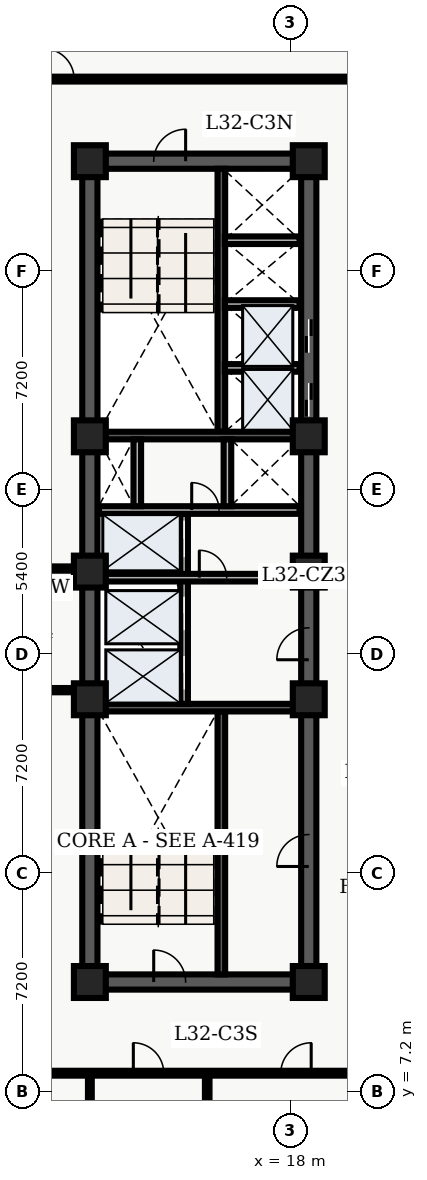
"""IFC4 building model, lengths in metres.
Left out: names, types, materials, properties, quantities, classifications, styles, units other than length and angle.
Written with IfcOpenShell. Run it as: python <this file> out.ifc"""

import sys

from ifc_helpers import new_model, entity, si_unit, converted_unit, direction, frame, origin_with_axes, origin_2d_with_axis, place, context, subcontext, project, spatial, polyline, rectangle, outline, extrude, element, fill, save


model = new_model("IFC4")
c1 = context("Model", 3, precision=1e-05, world=origin_with_axes(), true_north=direction((0.0, 1.0)))
c2 = subcontext(c1, "Body", "Model", "MODEL_VIEW")
j1 = project(units=[si_unit("LENGTHUNIT", "METRE"), converted_unit("PLANEANGLEUNIT", "DEGREE", entity("IfcPlaneAngleMeasure", 0.017), si_unit("PLANEANGLEUNIT", "RADIAN"), dimensions=[0, 0, 0, 0, 0, 0, 0])], contexts=[c1])
p1 = place(None, origin_with_axes())
s1 = spatial("IfcSite", under=j1, at=p1, CompositionType="ELEMENT")
p2 = place(p1, origin_with_axes())
s2 = spatial("IfcBuilding", under=s1, at=p2, CompositionType="ELEMENT")
p3 = place(p2, frame((0.0, 0.0, 132.9), z_axis=(0.0, 0.0, 1.0), x_axis=(1.0, 0.0, 0.0)))
s3 = spatial("IfcBuildingStorey", under=s2, at=p3, CompositionType="ELEMENT", Elevation=132.9)
p4 = place(p3, frame((11.4, 10.8, 0.0), z_axis=(0.0, 0.0, 1.0), x_axis=(0.0, 1.0, 0.0)))
e1 = element("IfcWall", 1, at=p4, inside=s3, PredefinedType="SHEAR", context=c2, shape_type="SweptSolid", body=[
    extrude(outline(polyline([(0.0, -0.25), (27.0, -0.25), (27.0, 0.25), (0.0, 0.25), (0.0, -0.25)])), origin_with_axes(), (0.0, 0.0, 1.0), 3.66),
])
p5 = place(p3, frame((11.4, 10.8, 0.0), z_axis=(0.0, 0.0, 1.0), x_axis=(1.0, 0.0, 0.0)))
e2 = element("IfcWall", 2, at=p5, inside=s3, PredefinedType="SHEAR", context=c2, shape_type="SweptSolid", body=[
    extrude(outline(polyline([(0.0, -0.25), (7.2, -0.25), (7.2, 0.25), (0.0, 0.25), (0.0, -0.25)])), origin_with_axes(), (0.0, 0.0, 1.0), 3.66),
])
p6 = place(p5, frame((2.625, 0.0, 0.0), z_axis=(0.0, 0.0, 1.0), x_axis=(1.0, 0.0, 0.0)))
e3 = element("IfcOpeningElement", 3, at=p6, cuts=e2, PredefinedType="OPENING", context=c2, shape_type="SweptSolid", body=[
    extrude(rectangle(XDim=1.05, YDim=0.52, at=origin_2d_with_axis()), origin_with_axes(), (0.0, 0.0, 1.0), 2.15),
])
p7 = place(p3, frame((11.4, 37.8, 0.0), z_axis=(0.0, 0.0, 1.0), x_axis=(1.0, 0.0, 0.0)))
e4 = element("IfcWall", 4, at=p7, inside=s3, PredefinedType="SHEAR", context=c2, shape_type="SweptSolid", body=[
    extrude(outline(polyline([(0.0, -0.25), (7.2, -0.25), (7.2, 0.25), (0.0, 0.25), (0.0, -0.25)])), origin_with_axes(), (0.0, 0.0, 1.0), 3.66),
])
p8 = place(p7, frame((2.625, 0.0, 0.0), z_axis=(0.0, 0.0, 1.0), x_axis=(1.0, 0.0, 0.0)))
e5 = element("IfcOpeningElement", 5, at=p8, cuts=e4, PredefinedType="OPENING", context=c2, shape_type="SweptSolid", body=[
    extrude(rectangle(XDim=1.05, YDim=0.52, at=origin_2d_with_axis()), origin_with_axes(), (0.0, 0.0, 1.0), 2.15),
])
p9 = place(p3, frame((18.6, 10.8, 0.0), z_axis=(0.0, 0.0, 1.0), x_axis=(0.0, 1.0, 0.0)))
e6 = element("IfcWall", 6, at=p9, inside=s3, PredefinedType="SHEAR", context=c2, shape_type="SweptSolid", body=[
    extrude(outline(polyline([(0.0, -0.25), (13.5, -0.25), (13.5, 0.25), (0.0, 0.25), (0.0, -0.25)])), origin_with_axes(), (0.0, 0.0, 1.0), 3.66),
])
p10 = place(p9, frame((11.125, 0.0, 0.0), z_axis=(0.0, 0.0, 1.0), x_axis=(1.0, 0.0, 0.0)))
e7 = element("IfcOpeningElement", 7, at=p10, cuts=e6, PredefinedType="OPENING", context=c2, shape_type="SweptSolid", body=[
    extrude(rectangle(XDim=1.05, YDim=0.52, at=origin_2d_with_axis()), origin_with_axes(), (0.0, 0.0, 1.0), 2.15),
])
p11 = place(p9, frame((4.325, 0.0, 0.0), z_axis=(0.0, 0.0, 1.0), x_axis=(1.0, 0.0, 0.0)))
e8 = element("IfcOpeningElement", 8, at=p11, cuts=e6, PredefinedType="OPENING", context=c2, shape_type="SweptSolid", body=[
    extrude(rectangle(XDim=1.05, YDim=0.52, at=origin_2d_with_axis()), origin_with_axes(), (0.0, 0.0, 1.0), 2.15),
])
p12 = place(p3, frame((18.6, 24.3, 0.0), z_axis=(0.0, 0.0, 1.0), x_axis=(0.0, 1.0, 0.0)))
e9 = element("IfcWall", 9, at=p12, inside=s3, PredefinedType="SHEAR", context=c2, shape_type="SweptSolid", body=[
    extrude(outline(polyline([(0.0, -0.25), (13.5, -0.25), (13.5, 0.25), (0.0, 0.25), (0.0, -0.25)])), origin_with_axes(), (0.0, 0.0, 1.0), 3.66),
])
p13 = place(p12, frame((5.65, 0.0, 0.0), z_axis=(0.0, 0.0, 1.0), x_axis=(1.0, 0.0, 0.0)))
e10 = element("IfcOpeningElement", 10, at=p13, cuts=e9, PredefinedType="OPENING", context=c2, shape_type="SweptSolid", body=[
    extrude(rectangle(XDim=1.1, YDim=0.52, at=origin_2d_with_axis()), origin_with_axes(), (0.0, 0.0, 1.0), 2.15),
])
p14 = place(p12, frame((7.75, 0.0, 0.0), z_axis=(0.0, 0.0, 1.0), x_axis=(1.0, 0.0, 0.0)))
e11 = element("IfcOpeningElement", 11, at=p14, cuts=e9, PredefinedType="OPENING", context=c2, shape_type="SweptSolid", body=[
    extrude(rectangle(XDim=1.1, YDim=0.52, at=origin_2d_with_axis()), origin_with_axes(), (0.0, 0.0, 1.0), 2.15),
])
p15 = place(p3, frame((15.725, 11.05, 0.0), z_axis=(0.0, 0.0, 1.0), x_axis=(0.0, 1.0, 0.0)))
e12 = element("IfcWall", 12, at=p15, inside=s3, PredefinedType="SHEAR", context=c2, shape_type="SweptSolid", body=[
    extrude(outline(polyline([(0.0, -0.125), (8.65, -0.125), (8.65, 0.125), (0.0, 0.125), (0.0, -0.125)])), origin_with_axes(), (0.0, 0.0, 1.0), 3.66),
])
p16 = place(p3, frame((11.65, 19.825, 0.0), z_axis=(0.0, 0.0, 1.0), x_axis=(1.0, 0.0, 0.0)))
e13 = element("IfcWall", 13, at=p16, inside=s3, PredefinedType="SHEAR", context=c2, shape_type="SweptSolid", body=[
    extrude(outline(polyline([(0.0, -0.125), (6.7, -0.125), (6.7, 0.125), (0.0, 0.125), (0.0, -0.125)])), origin_with_axes(), (0.0, 0.0, 1.0), 3.66),
])
p17 = place(p3, frame((15.725, 28.9, 0.0), z_axis=(0.0, 0.0, 1.0), x_axis=(0.0, 1.0, 0.0)))
e14 = element("IfcWall", 14, at=p17, inside=s3, PredefinedType="SHEAR", context=c2, shape_type="SweptSolid", body=[
    extrude(outline(polyline([(0.0, -0.125), (8.65, -0.125), (8.65, 0.125), (0.0, 0.125), (0.0, -0.125)])), origin_with_axes(), (0.0, 0.0, 1.0), 3.66),
])
p18 = place(p3, frame((11.65, 28.775, 0.0), z_axis=(0.0, 0.0, 1.0), x_axis=(1.0, 0.0, 0.0)))
e15 = element("IfcWall", 15, at=p18, inside=s3, PredefinedType="SHEAR", context=c2, shape_type="SweptSolid", body=[
    extrude(outline(polyline([(0.0, -0.125), (6.7, -0.125), (6.7, 0.125), (0.0, 0.125), (0.0, -0.125)])), origin_with_axes(), (0.0, 0.0, 1.0), 3.66),
])
p19 = place(p3, frame((14.5, 19.95, 0.0), z_axis=(0.0, 0.0, 1.0), x_axis=(0.0, 1.0, 0.0)))
e16 = element("IfcWall", 16, at=p19, inside=s3, PredefinedType="SOLIDWALL", context=c2, shape_type="SweptSolid", body=[
    extrude(outline(polyline([(0.0, -0.125), (6.25, -0.125), (6.25, 0.125), (0.0, 0.125), (0.0, -0.125)])), origin_with_axes(), (0.0, 0.0, 1.0), 2.7),
])
p20 = place(p19, frame((1.025, 0.0, 0.0), z_axis=(0.0, 0.0, 1.0), x_axis=(1.0, 0.0, 0.0)))
e17 = element("IfcOpeningElement", 17, at=p20, cuts=e16, PredefinedType="OPENING", context=c2, shape_type="SweptSolid", body=[
    extrude(rectangle(XDim=1.1, YDim=0.27, at=origin_2d_with_axis()), origin_with_axes(), (0.0, 0.0, 1.0), 2.15),
])
p21 = place(p19, frame((2.975, 0.0, 0.0), z_axis=(0.0, 0.0, 1.0), x_axis=(1.0, 0.0, 0.0)))
e18 = element("IfcOpeningElement", 18, at=p21, cuts=e16, PredefinedType="OPENING", context=c2, shape_type="SweptSolid", body=[
    extrude(rectangle(XDim=1.1, YDim=0.27, at=origin_2d_with_axis()), origin_with_axes(), (0.0, 0.0, 1.0), 2.15),
])
p22 = place(p19, frame((5.425, 0.0, 0.0), z_axis=(0.0, 0.0, 1.0), x_axis=(1.0, 0.0, 0.0)))
e19 = element("IfcOpeningElement", 19, at=p22, cuts=e16, PredefinedType="OPENING", context=c2, shape_type="SweptSolid", body=[
    extrude(rectangle(XDim=1.2, YDim=0.27, at=origin_2d_with_axis()), origin_with_axes(), (0.0, 0.0, 1.0), 2.15),
])
p23 = place(p3, frame((11.7, 24.1, 0.0), z_axis=(0.0, 0.0, 1.0), x_axis=(1.0, 0.0, 0.0)))
e20 = element("IfcWall", 20, at=p23, inside=s3, PredefinedType="SOLIDWALL", context=c2, shape_type="SweptSolid", body=[
    extrude(outline(polyline([(0.0, -0.125), (6.6, -0.125), (6.6, 0.125), (0.0, 0.125), (0.0, -0.125)])), origin_with_axes(), (0.0, 0.0, 1.0), 2.7),
])
p24 = place(p23, frame((3.75, 0.0, 0.0), z_axis=(0.0, 0.0, 1.0), x_axis=(1.0, 0.0, 0.0)))
e21 = element("IfcOpeningElement", 21, at=p24, cuts=e20, PredefinedType="OPENING", context=c2, shape_type="SweptSolid", body=[
    extrude(rectangle(XDim=0.9, YDim=0.27, at=origin_2d_with_axis()), origin_with_axes(), (0.0, 0.0, 1.0), 2.15),
])
p25 = place(p3, frame((11.7, 26.325, 0.0), z_axis=(0.0, 0.0, 1.0), x_axis=(1.0, 0.0, 0.0)))
e22 = element("IfcWall", 22, at=p25, inside=s3, PredefinedType="SOLIDWALL", context=c2, shape_type="SweptSolid", body=[
    extrude(outline(polyline([(0.0, -0.125), (6.6, -0.125), (6.6, 0.125), (0.0, 0.125), (0.0, -0.125)])), origin_with_axes(), (0.0, 0.0, 1.0), 2.7),
])
p26 = place(p25, frame((3.5, 0.0, 0.0), z_axis=(0.0, 0.0, 1.0), x_axis=(1.0, 0.0, 0.0)))
e23 = element("IfcOpeningElement", 23, at=p26, cuts=e22, PredefinedType="OPENING", context=c2, shape_type="SweptSolid", body=[
    extrude(rectangle(XDim=0.9, YDim=0.27, at=origin_2d_with_axis()), origin_with_axes(), (0.0, 0.0, 1.0), 2.15),
])
for number, where, z_axis, x_axis in (
    (24, (12.96, 26.45, 0.0), (0.0, 0.0, 1.0), (0.0, 1.0, 0.0)),
    (25, (15.925, 26.45, 0.0), (0.0, 0.0, 1.0), (0.0, 1.0, 0.0)),
):
    element("IfcWall", number, at=place(p3, frame(where, z_axis=z_axis, x_axis=x_axis)), inside=s3, PredefinedType="SOLIDWALL", context=c2, shape_type="SweptSolid", body=[
        extrude(outline(polyline([(0.0, -0.125), (2.2, -0.125), (2.2, 0.125), (0.0, 0.125), (0.0, -0.125)])), origin_with_axes(), (0.0, 0.0, 1.0), 2.7),
    ])
for number, where, z_axis, x_axis in (
    (26, (11.4, 10.8, 0.0), (0.0, 0.0, 1.0), (1.0, 0.0, 0.0)),
    (27, (11.4, 20.1, 0.0), (0.0, 0.0, 1.0), (1.0, 0.0, 0.0)),
    (28, (11.4, 24.3, 0.0), (0.0, 0.0, 1.0), (1.0, 0.0, 0.0)),
    (29, (11.4, 28.75, 0.0), (0.0, 0.0, 1.0), (1.0, 0.0, 0.0)),
    (30, (11.4, 37.8, 0.0), (0.0, 0.0, 1.0), (1.0, 0.0, 0.0)),
    (31, (18.6, 10.8, 0.0), (0.0, 0.0, 1.0), (1.0, 0.0, 0.0)),
    (32, (18.6, 20.1, 0.0), (0.0, 0.0, 1.0), (1.0, 0.0, 0.0)),
    (33, (18.6, 24.3, 0.0), (0.0, 0.0, 1.0), (1.0, 0.0, 0.0)),
    (34, (18.6, 28.75, 0.0), (0.0, 0.0, 1.0), (1.0, 0.0, 0.0)),
    (35, (18.6, 37.8, 0.0), (0.0, 0.0, 1.0), (1.0, 0.0, 0.0)),
):
    element("IfcColumn", number, at=place(p3, frame(where, z_axis=z_axis, x_axis=x_axis)), inside=s3, PredefinedType="COLUMN", context=c2, shape_type="SweptSolid", body=[
        extrude(rectangle(XDim=1.05, YDim=1.05, at=origin_2d_with_axis()), origin_with_axes(), (0.0, 0.0, 1.0), 3.9),
    ])
for number, where, z_axis, x_axis in (
    (36, (15.84, 31.0, 0.0), (0.0, 0.0, 1.0), (1.0, 0.0, 0.0)),
    (37, (15.84, 33.1, 0.0), (0.0, 0.0, 1.0), (1.0, 0.0, 0.0)),
    (38, (15.84, 35.2, 0.0), (0.0, 0.0, 1.0), (1.0, 0.0, 0.0)),
):
    element("IfcWall", number, at=place(p3, frame(where, z_axis=z_axis, x_axis=x_axis)), inside=s3, PredefinedType="SOLIDWALL", context=c2, shape_type="SweptSolid", body=[
        extrude(outline(polyline([(0.0, -0.125), (2.46, -0.125), (2.46, 0.125), (0.0, 0.125), (0.0, -0.125)])), origin_with_axes(), (0.0, 0.0, 1.0), 2.7),
    ])
for number, where, z_axis, x_axis in (
    (39, (9.52, 20.4, 0.0), (0.0, 0.0, 1.0), (1.0, 0.0, 0.0)),
    (40, (9.52, 24.4, 0.0), (0.0, 0.0, 1.0), (1.0, 0.0, 0.0)),
):
    element("IfcWall", number, at=place(p3, frame(where, z_axis=z_axis, x_axis=x_axis)), inside=s3, PredefinedType="PARTITIONING", context=c2, shape_type="SweptSolid", body=[
        extrude(outline(polyline([(0.0, -0.07), (1.58, -0.07), (1.58, 0.07), (0.0, 0.07), (0.0, -0.07)])), origin_with_axes(), (0.0, 0.0, 1.0), 2.7),
    ])
p27 = place(p3, frame((2.6, 7.8, 0.0), z_axis=(0.0, 0.0, 1.0), x_axis=(1.0, 0.0, 0.0)))
e41 = element("IfcWall", 41, at=p27, inside=s3, PredefinedType="PARTITIONING", context=c2, shape_type="SweptSolid", body=[
    extrude(outline(polyline([(0.0, -0.08), (18.55, -0.08), (18.55, 0.08), (0.0, 0.08), (0.0, -0.08)])), origin_with_axes(), (0.0, 0.0, 1.0), 2.7),
])
p28 = place(p27, frame((1.55, 0.0, 0.0), z_axis=(0.0, 0.0, 1.0), x_axis=(1.0, 0.0, 0.0)))
e42 = element("IfcOpeningElement", 42, at=p28, cuts=e41, PredefinedType="OPENING", context=c2, shape_type="SweptSolid", body=[
    extrude(rectangle(XDim=1.0, YDim=0.18, at=origin_2d_with_axis()), origin_with_axes(), (0.0, 0.0, 1.0), 2.15),
])
p29 = place(p27, frame((6.235, 0.0, 0.0), z_axis=(0.0, 0.0, 1.0), x_axis=(1.0, 0.0, 0.0)))
e43 = element("IfcOpeningElement", 43, at=p29, cuts=e41, PredefinedType="OPENING", context=c2, shape_type="SweptSolid", body=[
    extrude(rectangle(XDim=1.0, YDim=0.18, at=origin_2d_with_axis()), origin_with_axes(), (0.0, 0.0, 1.0), 2.15),
])
p30 = place(p27, frame((10.73, 0.0, 0.0), z_axis=(0.0, 0.0, 1.0), x_axis=(1.0, 0.0, 0.0)))
e44 = element("IfcOpeningElement", 44, at=p30, cuts=e41, PredefinedType="OPENING", context=c2, shape_type="SweptSolid", body=[
    extrude(rectangle(XDim=1.0, YDim=0.18, at=origin_2d_with_axis()), origin_with_axes(), (0.0, 0.0, 1.0), 2.15),
])
p31 = place(p27, frame((15.58, 0.0, 0.0), z_axis=(0.0, 0.0, 1.0), x_axis=(1.0, 0.0, 0.0)))
e45 = element("IfcOpeningElement", 45, at=p31, cuts=e41, PredefinedType="OPENING", context=c2, shape_type="SweptSolid", body=[
    extrude(rectangle(XDim=1.0, YDim=0.18, at=origin_2d_with_axis()), origin_with_axes(), (0.0, 0.0, 1.0), 2.15),
])
p32 = place(p3, frame((2.6, 40.5, 0.0), z_axis=(0.0, 0.0, 1.0), x_axis=(1.0, 0.0, 0.0)))
e46 = element("IfcWall", 46, at=p32, inside=s3, PredefinedType="PARTITIONING", context=c2, shape_type="SweptSolid", body=[
    extrude(outline(polyline([(0.0, -0.08), (18.769, -0.08), (18.769, 0.08), (0.0, 0.08), (0.0, -0.08)])), origin_with_axes(), (0.0, 0.0, 1.0), 2.7),
])
p33 = place(p32, frame((7.782, 0.0, 0.0), z_axis=(0.0, 0.0, 1.0), x_axis=(1.0, 0.0, 0.0)))
e47 = element("IfcOpeningElement", 47, at=p33, cuts=e46, PredefinedType="OPENING", context=c2, shape_type="SweptSolid", body=[
    extrude(rectangle(XDim=1.0, YDim=0.18, at=origin_2d_with_axis()), origin_with_axes(), (0.0, 0.0, 1.0), 2.15),
])
p34 = place(p3, frame((11.4, 0.335, 0.0), z_axis=(0.0, 0.0, 1.0), x_axis=(0.0, 1.0, 0.0)))
e48 = element("IfcWall", 48, at=p34, inside=s3, PredefinedType="PARTITIONING", context=c2, shape_type="SweptSolid", body=[
    extrude(outline(polyline([(0.0, -0.062), (7.365, -0.062), (7.365, 0.062), (0.0, 0.062), (0.0, -0.062)])), origin_with_axes(), (0.0, 0.0, 1.0), 2.7),
])
p35 = place(p3, frame((15.26, 0.335, 0.0), z_axis=(0.0, 0.0, 1.0), x_axis=(0.0, 1.0, 0.0)))
e49 = element("IfcWall", 49, at=p35, inside=s3, PredefinedType="PARTITIONING", context=c2, shape_type="SweptSolid", body=[
    extrude(outline(polyline([(0.0, -0.075), (7.365, -0.075), (7.365, 0.075), (0.0, 0.075), (0.0, -0.075)])), origin_with_axes(), (0.0, 0.0, 1.0), 2.7),
])
p36 = place(p12, frame((5.65, 0.0, 0.0), z_axis=(0.0, 0.0, 1.0), x_axis=(1.0, 0.0, 0.0)))
e50 = element("IfcDoor", 50, at=p36, inside=s3, OperationType="SLIDING_TO_LEFT", PredefinedType="DOOR", context=c2, shape_type="SweptSolid", body=[
    extrude(rectangle(XDim=1.1, YDim=0.09, at=origin_2d_with_axis()), origin_with_axes(), (0.0, 0.0, 1.0), 2.15),
])
fill(e10, e50)
p37 = place(p12, frame((7.75, 0.0, 0.0), z_axis=(0.0, 0.0, 1.0), x_axis=(1.0, 0.0, 0.0)))
e51 = element("IfcDoor", 51, at=p37, inside=s3, OperationType="SLIDING_TO_RIGHT", PredefinedType="DOOR", context=c2, shape_type="SweptSolid", body=[
    extrude(rectangle(XDim=1.1, YDim=0.09, at=origin_2d_with_axis()), origin_with_axes(), (0.0, 0.0, 1.0), 2.15),
])
fill(e11, e51)
p38 = place(p19, frame((1.025, 0.0, 0.0), z_axis=(0.0, 0.0, 1.0), x_axis=(1.0, 0.0, 0.0)))
e52 = element("IfcDoor", 52, at=p38, inside=s3, OperationType="SLIDING_TO_LEFT", PredefinedType="DOOR", context=c2, shape_type="SweptSolid", body=[
    extrude(rectangle(XDim=1.1, YDim=0.09, at=origin_2d_with_axis()), origin_with_axes(), (0.0, 0.0, 1.0), 2.15),
])
fill(e17, e52)
p39 = place(p19, frame((2.975, 0.0, 0.0), z_axis=(0.0, 0.0, 1.0), x_axis=(1.0, 0.0, 0.0)))
e53 = element("IfcDoor", 53, at=p39, inside=s3, OperationType="SLIDING_TO_RIGHT", PredefinedType="DOOR", context=c2, shape_type="SweptSolid", body=[
    extrude(rectangle(XDim=1.1, YDim=0.09, at=origin_2d_with_axis()), origin_with_axes(), (0.0, 0.0, 1.0), 2.15),
])
fill(e18, e53)
p40 = place(p19, frame((5.425, 0.0, 0.0), z_axis=(0.0, 0.0, 1.0), x_axis=(1.0, 0.0, 0.0)))
e54 = element("IfcDoor", 54, at=p40, inside=s3, OperationType="DOUBLE_DOOR_SLIDING", PredefinedType="DOOR", context=c2, shape_type="SweptSolid", body=[
    extrude(rectangle(XDim=1.2, YDim=0.09, at=origin_2d_with_axis()), origin_with_axes(), (0.0, 0.0, 1.0), 2.15),
])
fill(e19, e54)
p41 = place(p5, frame((2.625, 0.0, 0.0), z_axis=(0.0, 0.0, 1.0), x_axis=(1.0, 0.0, 0.0)))
e55 = element("IfcDoor", 55, at=p41, inside=s3, OperationType="SINGLE_SWING_LEFT", PredefinedType="DOOR", context=c2, shape_type="SweptSolid", body=[
    extrude(rectangle(XDim=1.05, YDim=0.09, at=origin_2d_with_axis()), origin_with_axes(), (0.0, 0.0, 1.0), 2.15),
])
fill(e3, e55)
p42 = place(p7, frame((2.625, 0.0, 0.0), z_axis=(0.0, 0.0, 1.0), x_axis=(1.0, 0.0, 0.0)))
e56 = element("IfcDoor", 56, at=p42, inside=s3, OperationType="SINGLE_SWING_RIGHT", PredefinedType="DOOR", context=c2, shape_type="SweptSolid", body=[
    extrude(rectangle(XDim=1.05, YDim=0.09, at=origin_2d_with_axis()), origin_with_axes(), (0.0, 0.0, 1.0), 2.15),
])
fill(e5, e56)
p43 = place(p9, frame((11.125, 0.0, 0.0), z_axis=(0.0, 0.0, 1.0), x_axis=(1.0, 0.0, 0.0)))
e57 = element("IfcDoor", 57, at=p43, inside=s3, OperationType="SINGLE_SWING_LEFT", PredefinedType="DOOR", context=c2, shape_type="SweptSolid", body=[
    extrude(rectangle(XDim=1.05, YDim=0.09, at=origin_2d_with_axis()), origin_with_axes(), (0.0, 0.0, 1.0), 2.15),
])
fill(e7, e57)
p44 = place(p23, frame((3.75, 0.0, 0.0), z_axis=(0.0, 0.0, 1.0), x_axis=(1.0, 0.0, 0.0)))
e58 = element("IfcDoor", 58, at=p44, inside=s3, OperationType="SINGLE_SWING_LEFT", PredefinedType="DOOR", context=c2, shape_type="SweptSolid", body=[
    extrude(rectangle(XDim=0.9, YDim=0.09, at=origin_2d_with_axis()), origin_with_axes(), (0.0, 0.0, 1.0), 2.15),
])
fill(e21, e58)
p45 = place(p25, frame((3.5, 0.0, 0.0), z_axis=(0.0, 0.0, 1.0), x_axis=(1.0, 0.0, 0.0)))
e59 = element("IfcDoor", 59, at=p45, inside=s3, OperationType="SINGLE_SWING_LEFT", PredefinedType="DOOR", context=c2, shape_type="SweptSolid", body=[
    extrude(rectangle(XDim=0.9, YDim=0.09, at=origin_2d_with_axis()), origin_with_axes(), (0.0, 0.0, 1.0), 2.15),
])
fill(e23, e59)
p46 = place(p9, frame((4.325, 0.0, 0.0), z_axis=(0.0, 0.0, 1.0), x_axis=(1.0, 0.0, 0.0)))
e60 = element("IfcDoor", 60, at=p46, inside=s3, OperationType="SINGLE_SWING_LEFT", PredefinedType="DOOR", context=c2, shape_type="SweptSolid", body=[
    extrude(rectangle(XDim=1.05, YDim=0.09, at=origin_2d_with_axis()), origin_with_axes(), (0.0, 0.0, 1.0), 2.15),
])
fill(e8, e60)
p47 = place(p27, frame((10.73, 0.0, 0.0), z_axis=(0.0, 0.0, 1.0), x_axis=(1.0, 0.0, 0.0)))
e61 = element("IfcDoor", 61, at=p47, inside=s3, OperationType="SINGLE_SWING_LEFT", PredefinedType="DOOR", context=c2, shape_type="SweptSolid", body=[
    extrude(rectangle(XDim=1.0, YDim=0.09, at=origin_2d_with_axis()), origin_with_axes(), (0.0, 0.0, 1.0), 2.15),
])
fill(e44, e61)
p48 = place(p27, frame((15.58, 0.0, 0.0), z_axis=(0.0, 0.0, 1.0), x_axis=(1.0, 0.0, 0.0)))
e62 = element("IfcDoor", 62, at=p48, inside=s3, OperationType="SINGLE_SWING_RIGHT", PredefinedType="DOOR", context=c2, shape_type="SweptSolid", body=[
    extrude(rectangle(XDim=1.0, YDim=0.09, at=origin_2d_with_axis()), origin_with_axes(), (0.0, 0.0, 1.0), 2.15),
])
fill(e45, e62)
p49 = place(p32, frame((7.782, 0.0, 0.0), z_axis=(0.0, 0.0, 1.0), x_axis=(1.0, 0.0, 0.0)))
e63 = element("IfcDoor", 63, at=p49, inside=s3, OperationType="SINGLE_SWING_LEFT", PredefinedType="DOOR", context=c2, shape_type="SweptSolid", body=[
    extrude(rectangle(XDim=1.0, YDim=0.09, at=origin_2d_with_axis()), origin_with_axes(), (0.0, 0.0, 1.0), 2.15),
])
fill(e47, e63)
save(model, sys.argv[1])
